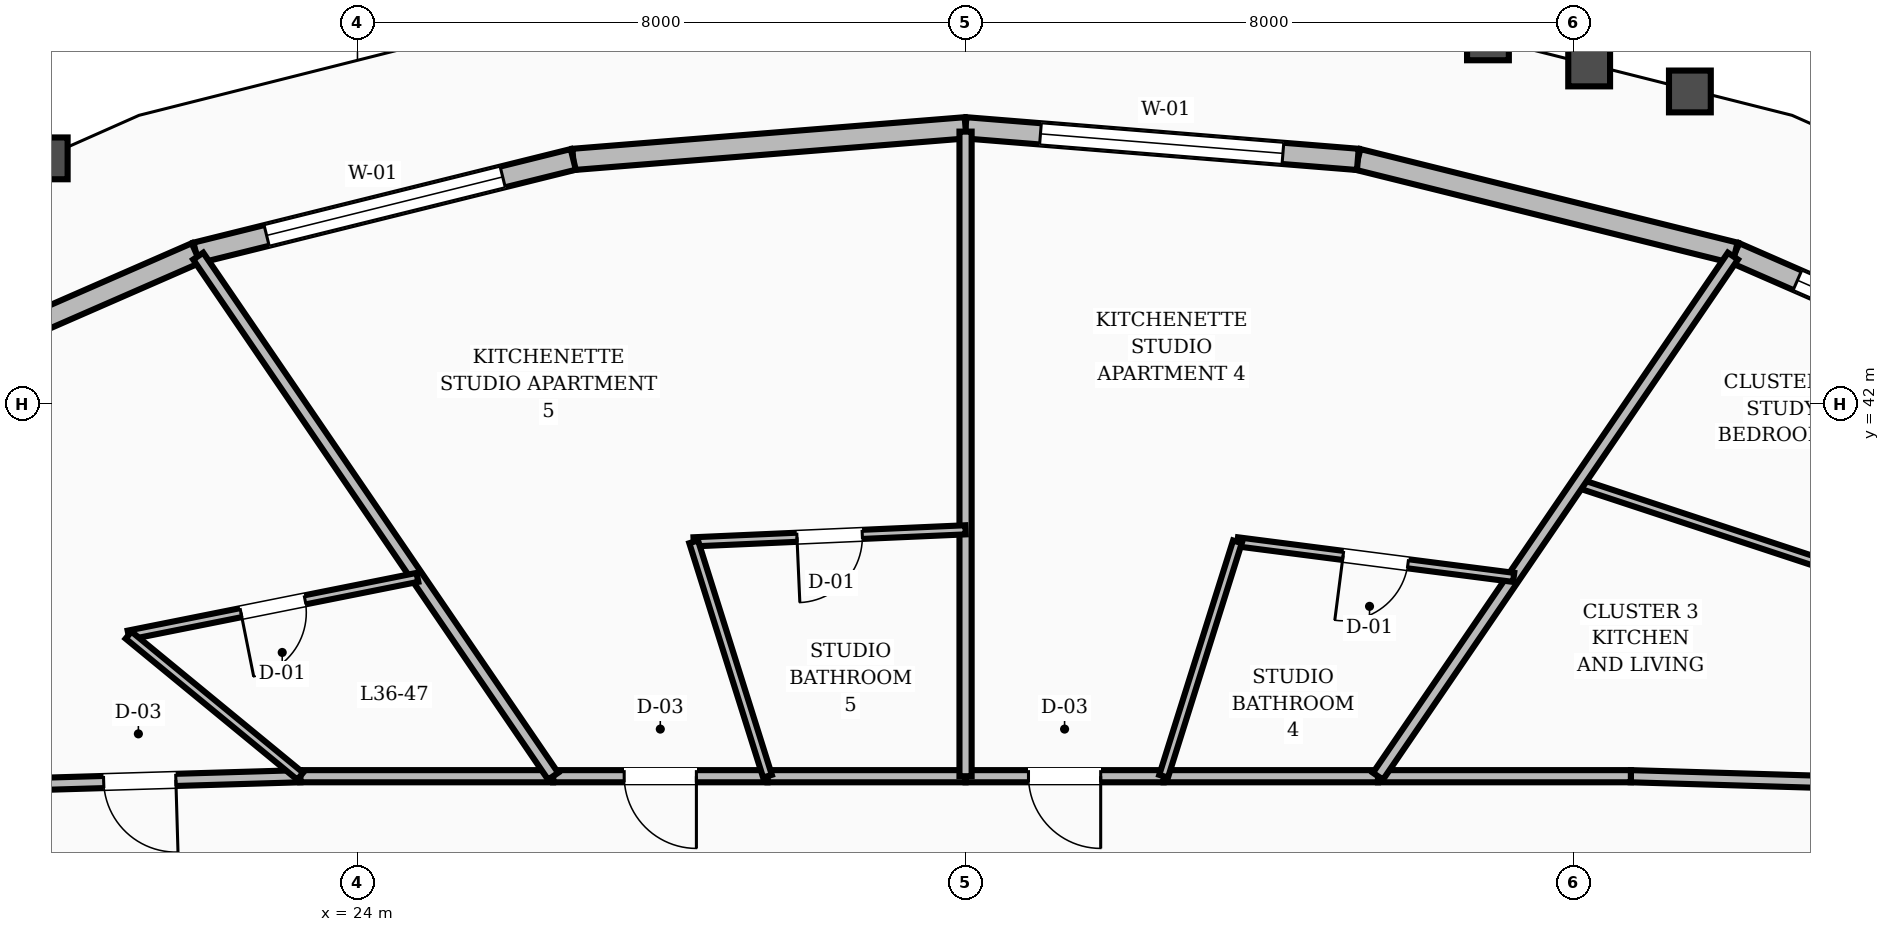
"""IFC4 building model, lengths in metres.
Left out: names, types, materials, properties, quantities, classifications, styles, units other than length and angle.
Written with IfcOpenShell. Run it as: python <this file> out.ifc"""

import sys

from ifc_helpers import new_model, si_unit, direction, frame, frame_2d, origin, place, context, subcontext, project, spatial, rectangle, extrude, element, fill, save


model = new_model("IFC4")
c1 = context("Model", 3, precision=1e-05, world=origin(), true_north=direction((0.0, 1.0)))
c2 = subcontext(c1, "Body", "Model", "MODEL_VIEW")
j1 = project(units=[si_unit("LENGTHUNIT", "METRE"), si_unit("PLANEANGLEUNIT", "RADIAN")], contexts=[c1])
p1 = place(None, origin())
s1 = spatial("IfcSite", under=j1, at=p1, CompositionType="ELEMENT")
p2 = place(p1, origin())
s2 = spatial("IfcBuilding", under=s1, at=p2, CompositionType="ELEMENT")
p3 = place(p2, frame((0.0, 0.0, 142.4)))
s3 = spatial("IfcBuildingStorey", under=s2, at=p3, CompositionType="ELEMENT", Elevation=142.4)
p4 = place(p3, frame((46.698, 41.985, 0.0), z_axis=(0.0, 0.0, 1.0), x_axis=(-0.916303206083, 0.400485248821, 0.0)))
e1 = element("IfcWall", 1, at=p4, inside=s3, PredefinedType="STANDARD", context=c2, shape_type="SweptSolid", body=[
    extrude(rectangle(XDim=4.991, YDim=0.28, at=frame_2d((2.496, 0.0))), origin(), (0.0, 0.0, 1.0), 2.82),
])
p5 = place(p4, frame((0.896, 0.0, 0.8)))
e2 = element("IfcOpeningElement", 2, at=p5, cuts=e1, PredefinedType="OPENING", context=c2, shape_type="SweptSolid", body=[
    extrude(rectangle(XDim=3.2, YDim=1.65, at=frame_2d((1.6, 0.825))), frame((0.0, 0.15, 0.0), z_axis=(0.0, -1.0, 0.0), x_axis=(1.0, 0.0, 0.0)), (0.0, 0.0, 1.0), 0.3),
])
p6 = place(p3, frame((42.124, 43.984, 0.0), z_axis=(0.0, 0.0, 1.0), x_axis=(-0.970601368837, 0.240692714498, 0.0)))
e3 = element("IfcWall", 3, at=p6, inside=s3, PredefinedType="STANDARD", context=c2, shape_type="SweptSolid", body=[
    extrude(rectangle(XDim=5.113, YDim=0.28, at=frame_2d((2.557, 0.0))), origin(), (0.0, 0.0, 1.0), 2.82),
])
p7 = place(p3, frame((37.161, 45.215, 0.0), z_axis=(0.0, 0.0, 1.0), x_axis=(-0.996770593757, 0.08030182701, 0.0)))
e4 = element("IfcWall", 4, at=p7, inside=s3, PredefinedType="STANDARD", context=c2, shape_type="SweptSolid", body=[
    extrude(rectangle(XDim=5.177, YDim=0.28, at=frame_2d((2.589, 0.0))), origin(), (0.0, 0.0, 1.0), 2.82),
])
p8 = place(p7, frame((0.989, 0.0, 0.8)))
e5 = element("IfcOpeningElement", 5, at=p8, cuts=e4, PredefinedType="OPENING", context=c2, shape_type="SweptSolid", body=[
    extrude(rectangle(XDim=3.2, YDim=1.65, at=frame_2d((1.6, 0.825))), frame((0.0, 0.15, 0.0), z_axis=(0.0, -1.0, 0.0), x_axis=(1.0, 0.0, 0.0)), (0.0, 0.0, 1.0), 0.3),
])
p9 = place(p3, frame((32.0, 45.63, 0.0), z_axis=(0.0, 0.0, 1.0), x_axis=(-0.996770593757, -0.08030182701, 0.0)))
e6 = element("IfcWall", 6, at=p9, inside=s3, PredefinedType="STANDARD", context=c2, shape_type="SweptSolid", body=[
    extrude(rectangle(XDim=5.177, YDim=0.28, at=frame_2d((2.589, 0.0))), origin(), (0.0, 0.0, 1.0), 2.82),
])
p10 = place(p3, frame((26.839, 45.215, 0.0), z_axis=(0.0, 0.0, 1.0), x_axis=(-0.970601368837, -0.240692714498, 0.0)))
e7 = element("IfcWall", 7, at=p10, inside=s3, PredefinedType="STANDARD", context=c2, shape_type="SweptSolid", body=[
    extrude(rectangle(XDim=5.113, YDim=0.28, at=frame_2d((2.557, 0.0))), origin(), (0.0, 0.0, 1.0), 2.82),
])
p11 = place(p10, frame((0.957, 0.0, 0.8)))
e8 = element("IfcOpeningElement", 8, at=p11, cuts=e7, PredefinedType="OPENING", context=c2, shape_type="SweptSolid", body=[
    extrude(rectangle(XDim=3.2, YDim=1.65, at=frame_2d((1.6, 0.825))), frame((0.0, 0.15, 0.0), z_axis=(0.0, -1.0, 0.0), x_axis=(1.0, 0.0, 0.0)), (0.0, 0.0, 1.0), 0.3),
])
p12 = place(p3, frame((21.876, 43.984, 0.0), z_axis=(0.0, 0.0, 1.0), x_axis=(-0.916303206083, -0.400485248821, 0.0)))
e9 = element("IfcWall", 9, at=p12, inside=s3, PredefinedType="STANDARD", context=c2, shape_type="SweptSolid", body=[
    extrude(rectangle(XDim=4.991, YDim=0.28, at=frame_2d((2.496, 0.0))), origin(), (0.0, 0.0, 1.0), 2.82),
])
p13 = place(p3, frame((44.975, 36.975, 0.0), z_axis=(0.0, 0.0, 1.0), x_axis=(-0.999561990195, 0.029594387265, 0.0)))
e10 = element("IfcWall", 10, at=p13, inside=s3, PredefinedType="SOLIDWALL", context=c2, shape_type="SweptSolid", body=[
    extrude(rectangle(XDim=4.224, YDim=0.16, at=frame_2d((2.112, 0.0))), origin(), (0.0, 0.0, 1.0), 2.8),
])
p14 = place(p3, frame((40.753, 37.1, 0.0), z_axis=(0.0, 0.0, 1.0), x_axis=(-1.0, 0.0, 0.0)))
e11 = element("IfcWall", 11, at=p14, inside=s3, PredefinedType="SOLIDWALL", context=c2, shape_type="SweptSolid", body=[
    extrude(rectangle(XDim=3.327, YDim=0.16, at=frame_2d((1.664, 0.0))), origin(), (0.0, 0.0, 1.0), 2.8),
])
p15 = place(p3, frame((37.426, 37.1, 0.0), z_axis=(0.0, 0.0, 1.0), x_axis=(-1.0, 0.0, 0.0)))
e12 = element("IfcWall", 12, at=p15, inside=s3, PredefinedType="SOLIDWALL", context=c2, shape_type="SweptSolid", body=[
    extrude(rectangle(XDim=2.821, YDim=0.16, at=frame_2d((1.41, 0.0))), origin(), (0.0, 0.0, 1.0), 2.8),
])
p16 = place(p3, frame((34.606, 37.1, 0.0), z_axis=(0.0, 0.0, 1.0), x_axis=(-1.0, 0.0, 0.0)))
e13 = element("IfcWall", 13, at=p16, inside=s3, PredefinedType="SOLIDWALL", context=c2, shape_type="SweptSolid", body=[
    extrude(rectangle(XDim=2.606, YDim=0.16, at=frame_2d((1.303, 0.0))), origin(), (0.0, 0.0, 1.0), 2.8),
])
p17 = place(p16, frame((0.828, 0.0, 0.0)))
e14 = element("IfcOpeningElement", 14, at=p17, cuts=e13, PredefinedType="OPENING", context=c2, shape_type="SweptSolid", body=[
    extrude(rectangle(XDim=0.95, YDim=2.1, at=frame_2d((0.475, 1.05))), frame((0.0, 0.09, 0.0), z_axis=(0.0, -1.0, 0.0), x_axis=(1.0, 0.0, 0.0)), (0.0, 0.0, 1.0), 0.18),
])
p18 = place(p3, frame((32.0, 37.1, 0.0), z_axis=(0.0, 0.0, 1.0), x_axis=(-1.0, 0.0, 0.0)))
e15 = element("IfcWall", 15, at=p18, inside=s3, PredefinedType="SOLIDWALL", context=c2, shape_type="SweptSolid", body=[
    extrude(rectangle(XDim=2.606, YDim=0.16, at=frame_2d((1.303, 0.0))), origin(), (0.0, 0.0, 1.0), 2.8),
])
p19 = place(p3, frame((29.394, 37.1, 0.0), z_axis=(0.0, 0.0, 1.0), x_axis=(-1.0, 0.0, 0.0)))
e16 = element("IfcWall", 16, at=p19, inside=s3, PredefinedType="SOLIDWALL", context=c2, shape_type="SweptSolid", body=[
    extrude(rectangle(XDim=2.821, YDim=0.16, at=frame_2d((1.41, 0.0))), origin(), (0.0, 0.0, 1.0), 2.8),
])
p20 = place(p19, frame((0.935, 0.0, 0.0)))
e17 = element("IfcOpeningElement", 17, at=p20, cuts=e16, PredefinedType="OPENING", context=c2, shape_type="SweptSolid", body=[
    extrude(rectangle(XDim=0.95, YDim=2.1, at=frame_2d((0.475, 1.05))), frame((0.0, 0.09, 0.0), z_axis=(0.0, -1.0, 0.0), x_axis=(1.0, 0.0, 0.0)), (0.0, 0.0, 1.0), 0.18),
])
p21 = place(p3, frame((26.574, 37.1, 0.0), z_axis=(0.0, 0.0, 1.0), x_axis=(-1.0, 0.0, 0.0)))
e18 = element("IfcWall", 18, at=p21, inside=s3, PredefinedType="SOLIDWALL", context=c2, shape_type="SweptSolid", body=[
    extrude(rectangle(XDim=3.327, YDim=0.16, at=frame_2d((1.664, 0.0))), origin(), (0.0, 0.0, 1.0), 2.8),
])
p22 = place(p3, frame((23.247, 37.1, 0.0), z_axis=(0.0, 0.0, 1.0), x_axis=(-0.999561990195, -0.029594387265, 0.0)))
e19 = element("IfcWall", 19, at=p22, inside=s3, PredefinedType="SOLIDWALL", context=c2, shape_type="SweptSolid", body=[
    extrude(rectangle(XDim=4.224, YDim=0.16, at=frame_2d((2.112, 0.0))), origin(), (0.0, 0.0, 1.0), 2.8),
])
p23 = place(p22, frame((1.637, 0.0, 0.0)))
e20 = element("IfcOpeningElement", 20, at=p23, cuts=e19, PredefinedType="OPENING", context=c2, shape_type="SweptSolid", body=[
    extrude(rectangle(XDim=0.95, YDim=2.1, at=frame_2d((0.475, 1.05))), frame((0.0, 0.09, 0.0), z_axis=(0.0, -1.0, 0.0), x_axis=(1.0, 0.0, 0.0)), (0.0, 0.0, 1.0), 0.18),
])
p24 = place(p3, frame((48.185, 38.274, 0.0), z_axis=(0.0, 0.0, 1.0), x_axis=(-0.949679826918, 0.313222327342, 0.0)))
e21 = element("IfcWall", 21, at=p24, inside=s3, PredefinedType="PARTITIONING", context=c2, shape_type="SweptSolid", body=[
    extrude(rectangle(XDim=8.558, YDim=0.12, at=frame_2d((4.279, 0.0))), origin(), (0.0, 0.0, 1.0), 2.8),
])
p25 = place(p24, frame((3.804, 0.0, 0.0)))
e22 = element("IfcOpeningElement", 22, at=p25, cuts=e21, PredefinedType="OPENING", context=c2, shape_type="SweptSolid", body=[
    extrude(rectangle(XDim=0.95, YDim=2.1, at=frame_2d((0.475, 1.05))), frame((0.0, 0.07, 0.0), z_axis=(0.0, -1.0, 0.0), x_axis=(1.0, 0.0, 0.0)), (0.0, 0.0, 1.0), 0.14),
])
p26 = place(p3, frame((37.426, 37.1, 0.0), z_axis=(0.0, 0.0, 1.0), x_axis=(0.563666009878, 0.82600280224, 0.0)))
e23 = element("IfcWall", 23, at=p26, inside=s3, PredefinedType="SOLIDWALL", context=c2, shape_type="SweptSolid", body=[
    extrude(rectangle(XDim=8.284, YDim=0.16, at=frame_2d((4.142, 0.0))), origin(), (0.0, 0.0, 1.0), 2.8),
])
p27 = place(p3, frame((39.211, 39.716, 0.0), z_axis=(0.0, 0.0, 1.0), x_axis=(-0.991818189367, 0.12765844759, 0.0)))
e24 = element("IfcWall", 24, at=p27, inside=s3, PredefinedType="PARTITIONING", context=c2, shape_type="SweptSolid", body=[
    extrude(rectangle(XDim=3.664, YDim=0.12, at=frame_2d((1.832, 0.0))), origin(), (0.0, 0.0, 1.0), 2.8),
])
p28 = place(p27, frame((1.402, 0.0, 0.0)))
e25 = element("IfcOpeningElement", 25, at=p28, cuts=e24, PredefinedType="OPENING", context=c2, shape_type="SweptSolid", body=[
    extrude(rectangle(XDim=0.86, YDim=2.1, at=frame_2d((0.43, 1.05))), frame((0.0, 0.07, 0.0), z_axis=(0.0, -1.0, 0.0), x_axis=(1.0, 0.0, 0.0)), (0.0, 0.0, 1.0), 0.14),
])
p29 = place(p3, frame((34.606, 37.1, 0.0), z_axis=(0.0, 0.0, 1.0), x_axis=(0.300415657208, 0.953808383746, 0.0)))
e26 = element("IfcWall", 26, at=p29, inside=s3, PredefinedType="PARTITIONING", context=c2, shape_type="SweptSolid", body=[
    extrude(rectangle(XDim=3.233, YDim=0.12, at=frame_2d((1.616, 0.0))), origin(), (0.0, 0.0, 1.0), 2.8),
])
p30 = place(p3, frame((32.0, 37.1, 0.0), z_axis=(0.0, 0.0, 1.0), x_axis=(0.0, 1.0, 0.0)))
e27 = element("IfcWall", 27, at=p30, inside=s3, PredefinedType="SOLIDWALL", context=c2, shape_type="SweptSolid", body=[
    extrude(rectangle(XDim=8.48, YDim=0.16, at=frame_2d((4.24, 0.0))), origin(), (0.0, 0.0, 1.0), 2.8),
])
p31 = place(p3, frame((32.0, 40.342, 0.0), z_axis=(0.0, 0.0, 1.0), x_axis=(-0.999026335395, -0.04411781032, 0.0)))
e28 = element("IfcWall", 28, at=p31, inside=s3, PredefinedType="PARTITIONING", context=c2, shape_type="SweptSolid", body=[
    extrude(rectangle(XDim=3.58, YDim=0.12, at=frame_2d((1.79, 0.0))), origin(), (0.0, 0.0, 1.0), 2.8),
])
p32 = place(p31, frame((1.36, 0.0, 0.0)))
e29 = element("IfcOpeningElement", 29, at=p32, cuts=e28, PredefinedType="OPENING", context=c2, shape_type="SweptSolid", body=[
    extrude(rectangle(XDim=0.86, YDim=2.1, at=frame_2d((0.43, 1.05))), frame((0.0, 0.07, 0.0), z_axis=(0.0, -1.0, 0.0), x_axis=(1.0, 0.0, 0.0)), (0.0, 0.0, 1.0), 0.14),
])
p33 = place(p3, frame((29.394, 37.1, 0.0), z_axis=(0.0, 0.0, 1.0), x_axis=(-0.300415657208, 0.953808383746, 0.0)))
e30 = element("IfcWall", 30, at=p33, inside=s3, PredefinedType="PARTITIONING", context=c2, shape_type="SweptSolid", body=[
    extrude(rectangle(XDim=3.233, YDim=0.12, at=frame_2d((1.616, 0.0))), origin(), (0.0, 0.0, 1.0), 2.8),
])
p34 = place(p3, frame((26.574, 37.1, 0.0), z_axis=(0.0, 0.0, 1.0), x_axis=(-0.563666009878, 0.82600280224, 0.0)))
e31 = element("IfcWall", 31, at=p34, inside=s3, PredefinedType="SOLIDWALL", context=c2, shape_type="SweptSolid", body=[
    extrude(rectangle(XDim=8.284, YDim=0.16, at=frame_2d((4.142, 0.0))), origin(), (0.0, 0.0, 1.0), 2.8),
])
p35 = place(p3, frame((24.789, 39.716, 0.0), z_axis=(0.0, 0.0, 1.0), x_axis=(-0.980612157528, -0.195958660205, 0.0)))
e32 = element("IfcWall", 32, at=p35, inside=s3, PredefinedType="PARTITIONING", context=c2, shape_type="SweptSolid", body=[
    extrude(rectangle(XDim=3.876, YDim=0.12, at=frame_2d((1.938, 0.0))), origin(), (0.0, 0.0, 1.0), 2.8),
])
p36 = place(p35, frame((1.508, 0.0, 0.0)))
e33 = element("IfcOpeningElement", 33, at=p36, cuts=e32, PredefinedType="OPENING", context=c2, shape_type="SweptSolid", body=[
    extrude(rectangle(XDim=0.86, YDim=2.1, at=frame_2d((0.43, 1.05))), frame((0.0, 0.07, 0.0), z_axis=(0.0, -1.0, 0.0), x_axis=(1.0, 0.0, 0.0)), (0.0, 0.0, 1.0), 0.14),
])
p37 = place(p3, frame((23.247, 37.1, 0.0), z_axis=(0.0, 0.0, 1.0), x_axis=(-0.772597513468, 0.634896119206, 0.0)))
e34 = element("IfcWall", 34, at=p37, inside=s3, PredefinedType="PARTITIONING", context=c2, shape_type="SweptSolid", body=[
    extrude(rectangle(XDim=2.924, YDim=0.12, at=frame_2d((1.462, 0.0))), origin(), (0.0, 0.0, 1.0), 2.8),
])
p38 = place(p5, origin())
e35 = element("IfcWindow", 35, at=p38, inside=s3, PartitioningType="SINGLE_PANEL", PredefinedType="WINDOW", context=c2, shape_type="SweptSolid", body=[
    extrude(rectangle(XDim=3.2, YDim=1.65, at=frame_2d((1.6, 0.825))), frame((0.0, 0.03, 0.0), z_axis=(0.0, -1.0, 0.0), x_axis=(1.0, 0.0, 0.0)), (0.0, 0.0, 1.0), 0.06),
])
fill(e2, e35)
p39 = place(p8, origin())
e36 = element("IfcWindow", 36, at=p39, inside=s3, PartitioningType="SINGLE_PANEL", PredefinedType="WINDOW", context=c2, shape_type="SweptSolid", body=[
    extrude(rectangle(XDim=3.2, YDim=1.65, at=frame_2d((1.6, 0.825))), frame((0.0, 0.03, 0.0), z_axis=(0.0, -1.0, 0.0), x_axis=(1.0, 0.0, 0.0)), (0.0, 0.0, 1.0), 0.06),
])
fill(e5, e36)
p40 = place(p11, origin())
e37 = element("IfcWindow", 37, at=p40, inside=s3, PartitioningType="SINGLE_PANEL", PredefinedType="WINDOW", context=c2, shape_type="SweptSolid", body=[
    extrude(rectangle(XDim=3.2, YDim=1.65, at=frame_2d((1.6, 0.825))), frame((0.0, 0.03, 0.0), z_axis=(0.0, -1.0, 0.0), x_axis=(1.0, 0.0, 0.0)), (0.0, 0.0, 1.0), 0.06),
])
fill(e8, e37)
p41 = place(p28, origin())
e38 = element("IfcDoor", 38, at=p41, inside=s3, OperationType="SINGLE_SWING_RIGHT", PredefinedType="DOOR", context=c2, shape_type="SweptSolid", body=[
    extrude(rectangle(XDim=0.86, YDim=2.1, at=frame_2d((0.43, 1.05))), frame((0.0, 0.025, 0.0), z_axis=(0.0, -1.0, 0.0), x_axis=(1.0, 0.0, 0.0)), (0.0, 0.0, 1.0), 0.05),
])
fill(e25, e38)
p42 = place(p17, origin())
e39 = element("IfcDoor", 39, at=p42, inside=s3, OperationType="SINGLE_SWING_LEFT", PredefinedType="DOOR", context=c2, shape_type="SweptSolid", body=[
    extrude(rectangle(XDim=0.95, YDim=2.1, at=frame_2d((0.475, 1.05))), frame((0.0, 0.025, 0.0), z_axis=(0.0, -1.0, 0.0), x_axis=(1.0, 0.0, 0.0)), (0.0, 0.0, 1.0), 0.05),
])
fill(e14, e39)
p43 = place(p32, origin())
e40 = element("IfcDoor", 40, at=p43, inside=s3, OperationType="SINGLE_SWING_RIGHT", PredefinedType="DOOR", context=c2, shape_type="SweptSolid", body=[
    extrude(rectangle(XDim=0.86, YDim=2.1, at=frame_2d((0.43, 1.05))), frame((0.0, 0.025, 0.0), z_axis=(0.0, -1.0, 0.0), x_axis=(1.0, 0.0, 0.0)), (0.0, 0.0, 1.0), 0.05),
])
fill(e29, e40)
p44 = place(p20, origin())
e41 = element("IfcDoor", 41, at=p44, inside=s3, OperationType="SINGLE_SWING_LEFT", PredefinedType="DOOR", context=c2, shape_type="SweptSolid", body=[
    extrude(rectangle(XDim=0.95, YDim=2.1, at=frame_2d((0.475, 1.05))), frame((0.0, 0.025, 0.0), z_axis=(0.0, -1.0, 0.0), x_axis=(1.0, 0.0, 0.0)), (0.0, 0.0, 1.0), 0.05),
])
fill(e17, e41)
p45 = place(p36, origin())
e42 = element("IfcDoor", 42, at=p45, inside=s3, OperationType="SINGLE_SWING_RIGHT", PredefinedType="DOOR", context=c2, shape_type="SweptSolid", body=[
    extrude(rectangle(XDim=0.86, YDim=2.1, at=frame_2d((0.43, 1.05))), frame((0.0, 0.025, 0.0), z_axis=(0.0, -1.0, 0.0), x_axis=(1.0, 0.0, 0.0)), (0.0, 0.0, 1.0), 0.05),
])
fill(e33, e42)
p46 = place(p23, origin())
e43 = element("IfcDoor", 43, at=p46, inside=s3, OperationType="SINGLE_SWING_LEFT", PredefinedType="DOOR", context=c2, shape_type="SweptSolid", body=[
    extrude(rectangle(XDim=0.95, YDim=2.1, at=frame_2d((0.475, 1.05))), frame((0.0, 0.025, 0.0), z_axis=(0.0, -1.0, 0.0), x_axis=(1.0, 0.0, 0.0)), (0.0, 0.0, 1.0), 0.05),
])
fill(e20, e43)
save(model, sys.argv[1])
